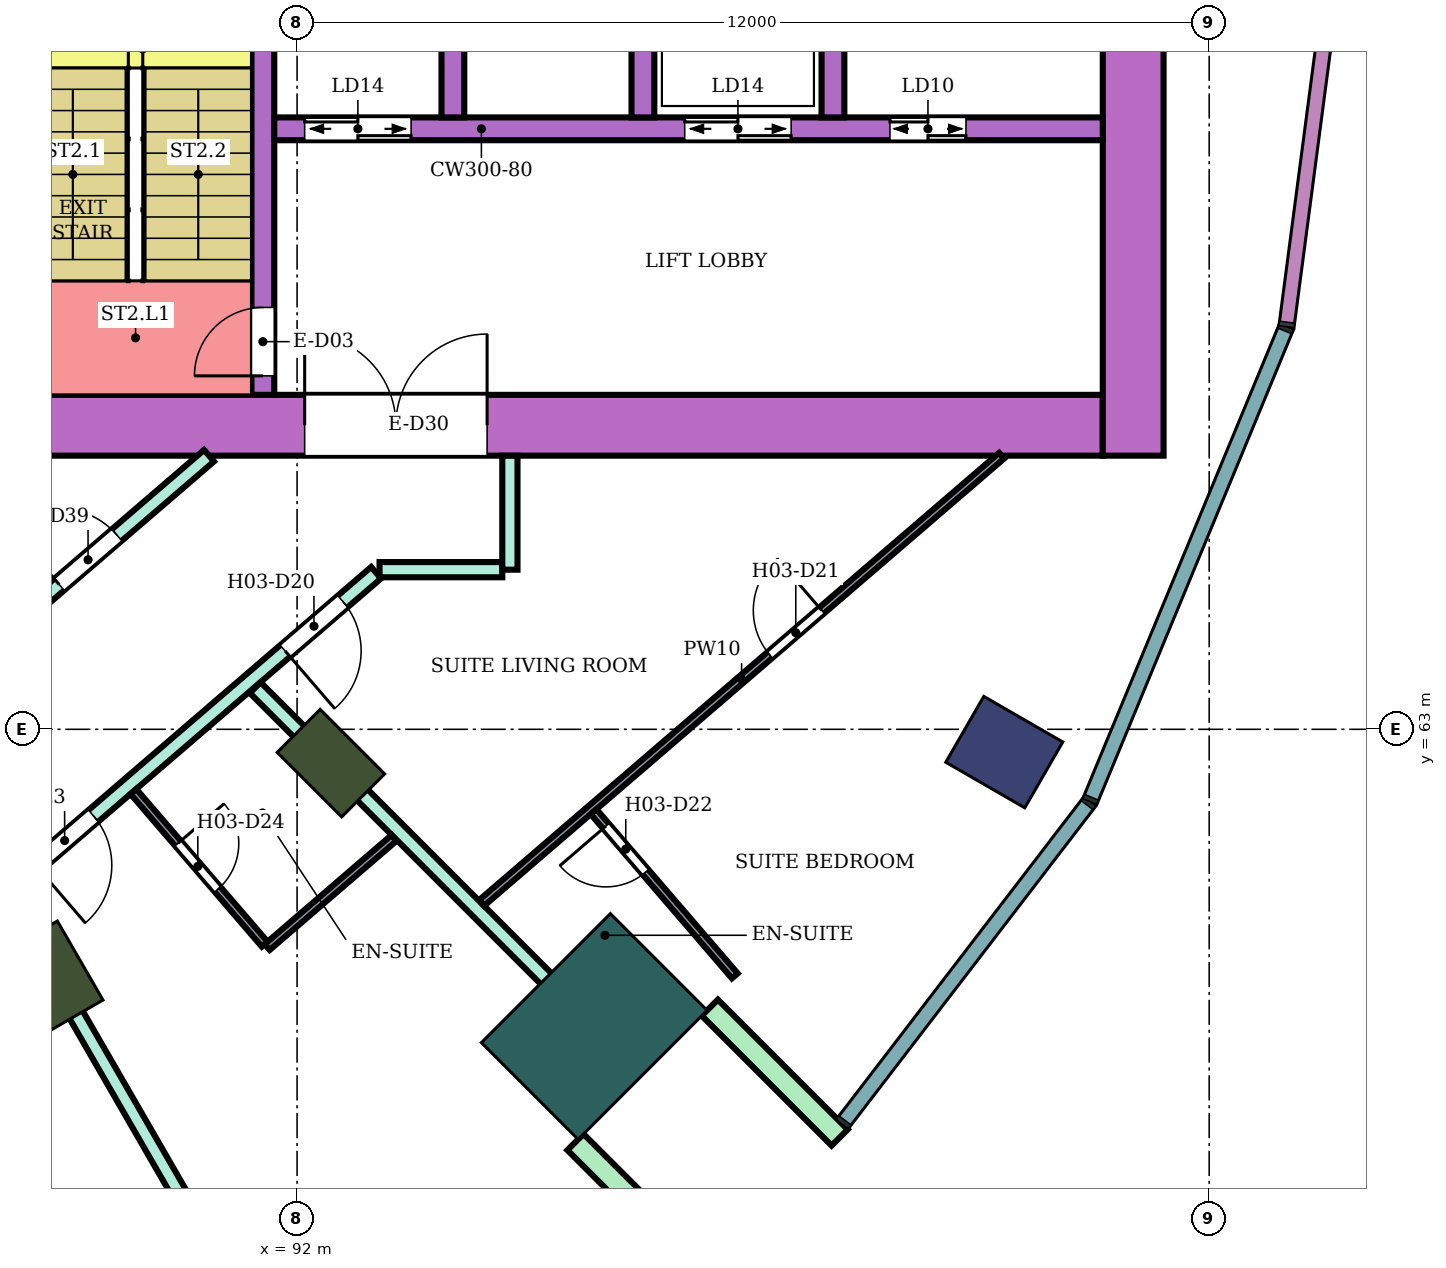
"""IFC4 building model, lengths in metres.
Left out: names, types, materials, properties, quantities, classifications, styles, units other than length and angle.
Written with IfcOpenShell. Run it as: python <this file> out.ifc"""

import sys

from ifc_helpers import new_model, si_unit, direction, frame, frame_2d, origin, origin_2d, place, context, subcontext, project, spatial, rectangle, extrude, element, fill, save


model = new_model("IFC4")
c1 = context("Model", 3, precision=1e-05, world=origin(), true_north=direction((0.0, 1.0)))
c2 = subcontext(c1, "Body", "Model", "MODEL_VIEW")
j1 = project(units=[si_unit("LENGTHUNIT", "METRE"), si_unit("PLANEANGLEUNIT", "RADIAN")], contexts=[c1])
p1 = place(None, origin())
s1 = spatial("IfcSite", under=j1, at=p1, CompositionType="ELEMENT")
p2 = place(p1, origin())
s2 = spatial("IfcBuilding", under=s1, at=p2, CompositionType="ELEMENT")
p3 = place(p2, frame((0.0, 0.0, 51.6)))
s3 = spatial("IfcBuildingStorey", under=s2, at=p3, CompositionType="ELEMENT", Elevation=51.6)
p4 = place(p3, frame((101.304, 62.7, 0.0), z_axis=(0.0, 0.0, 1.0), x_axis=(0.866025403784, -0.5, 0.0)))
e1 = element("IfcColumn", 1, at=p4, inside=s3, PredefinedType="COLUMN", context=c2, shape_type="SweptSolid", body=[
    extrude(rectangle(XDim=1.2, YDim=1.0, at=origin_2d()), origin(), (0.0, 0.0, 1.0), 3.8),
])
for number, where, z_axis, x_axis in (
    (2, (88.8, 59.758, 0.0), (0.0, 0.0, 1.0), (0.5, -0.866, 0.0)),
    (3, (92.445, 62.555, 0.0), (0.0, 0.0, 1.0), (0.707, -0.707, 0.0)),
):
    element("IfcColumn", number, at=place(p3, frame(where, z_axis=z_axis, x_axis=x_axis)), inside=s3, PredefinedType="COLUMN", context=c2, shape_type="SweptSolid", body=[
        extrude(rectangle(XDim=1.2, YDim=0.8, at=origin_2d()), origin(), (0.0, 0.0, 1.0), 3.8),
    ])
p5 = place(p3, frame((95.91, 59.09, 0.0), z_axis=(0.0, 0.0, 1.0), x_axis=(0.707106781187, -0.707106781187, 0.0)))
e4 = element("IfcColumn", 4, at=p5, inside=s3, PredefinedType="COLUMN", context=c2, shape_type="SweptSolid", body=[
    extrude(rectangle(XDim=1.8, YDim=2.4, at=origin_2d()), origin(), (0.0, 0.0, 1.0), 3.8),
])
p6 = place(p3, frame((87.9, 67.0, 0.0), z_axis=(0.0, 0.0, 1.0), x_axis=(1.0, 0.0, 0.0)))
e5 = element("IfcWall", 5, at=p6, inside=s3, PredefinedType="SHEAR", context=c2, shape_type="SweptSolid", body=[
    extrude(rectangle(XDim=14.7, YDim=0.8, at=frame_2d((7.35, 0.0))), origin(), (0.0, 0.0, 1.0), 3.48),
])
p7 = place(p6, frame((4.2, 0.0, 0.0)))
e6 = element("IfcOpeningElement", 6, at=p7, cuts=e5, PredefinedType="OPENING", context=c2, shape_type="SweptSolid", body=[
    extrude(rectangle(XDim=2.4, YDim=2.4, at=frame_2d((1.2, 1.2))), frame((0.0, 0.41, 0.0), z_axis=(0.0, -1.0, 0.0), x_axis=(1.0, 0.0, 0.0)), (0.0, 0.0, 1.0), 0.82),
])
p8 = place(p3, frame((103.0, 66.6, 0.0), z_axis=(0.0, 0.0, 1.0), x_axis=(0.0, 1.0, 0.0)))
e7 = element("IfcWall", 7, at=p8, inside=s3, PredefinedType="SHEAR", context=c2, shape_type="SweptSolid", body=[
    extrude(rectangle(XDim=16.8, YDim=0.8, at=frame_2d((8.4, 0.0))), origin(), (0.0, 0.0, 1.0), 3.48),
])
p9 = place(p3, frame((91.55, 67.4, 0.0), z_axis=(0.0, 0.0, 1.0), x_axis=(0.0, 1.0, 0.0)))
e8 = element("IfcWall", 8, at=p9, inside=s3, PredefinedType="SHEAR", context=c2, shape_type="SweptSolid", body=[
    extrude(rectangle(XDim=7.6, YDim=0.3, at=frame_2d((3.8, 0.0))), origin(), (0.0, 0.0, 1.0), 3.48),
])
p10 = place(p9, frame((0.25, 0.0, 0.0)))
e9 = element("IfcOpeningElement", 9, at=p10, cuts=e8, PredefinedType="OPENING", context=c2, shape_type="SweptSolid", body=[
    extrude(rectangle(XDim=0.9, YDim=2.1, at=frame_2d((0.45, 1.05))), frame((0.0, 0.16, 0.0), z_axis=(0.0, -1.0, 0.0), x_axis=(1.0, 0.0, 0.0)), (0.0, 0.0, 1.0), 0.32),
])
p11 = place(p3, frame((91.7, 70.9, 0.0), z_axis=(0.0, 0.0, 1.0), x_axis=(1.0, 0.0, 0.0)))
e10 = element("IfcWall", 10, at=p11, inside=s3, PredefinedType="SHEAR", context=c2, shape_type="SweptSolid", body=[
    extrude(rectangle(XDim=10.9, YDim=0.3, at=frame_2d((5.45, 0.0))), origin(), (0.0, 0.0, 1.0), 3.48),
])
p12 = place(p11, frame((0.4, 0.0, 0.0)))
e11 = element("IfcOpeningElement", 11, at=p12, cuts=e10, PredefinedType="OPENING", context=c2, shape_type="SweptSolid", body=[
    extrude(rectangle(XDim=1.4, YDim=2.1, at=frame_2d((0.7, 1.05))), frame((0.0, 0.16, 0.0), z_axis=(0.0, -1.0, 0.0), x_axis=(1.0, 0.0, 0.0)), (0.0, 0.0, 1.0), 0.32),
])
p13 = place(p11, frame((5.4, 0.0, 0.0)))
e12 = element("IfcOpeningElement", 12, at=p13, cuts=e10, PredefinedType="OPENING", context=c2, shape_type="SweptSolid", body=[
    extrude(rectangle(XDim=1.4, YDim=2.1, at=frame_2d((0.7, 1.05))), frame((0.0, 0.16, 0.0), z_axis=(0.0, -1.0, 0.0), x_axis=(1.0, 0.0, 0.0)), (0.0, 0.0, 1.0), 0.32),
])
p14 = place(p11, frame((8.1, 0.0, 0.0)))
e13 = element("IfcOpeningElement", 13, at=p14, cuts=e10, PredefinedType="OPENING", context=c2, shape_type="SweptSolid", body=[
    extrude(rectangle(XDim=1.0, YDim=2.1, at=frame_2d((0.5, 1.05))), frame((0.0, 0.16, 0.0), z_axis=(0.0, -1.0, 0.0), x_axis=(1.0, 0.0, 0.0)), (0.0, 0.0, 1.0), 0.32),
])
for number, where, z_axis, x_axis in (
    (14, (94.05, 71.05, 0.0), (0.0, 0.0, 1.0), (0.0, 1.0, 0.0)),
    (15, (96.55, 71.05, 0.0), (0.0, 0.0, 1.0), (0.0, 1.0, 0.0)),
    (16, (99.05, 71.05, 0.0), (0.0, 0.0, 1.0), (0.0, 1.0, 0.0)),
):
    element("IfcWall", number, at=place(p3, frame(where, z_axis=z_axis, x_axis=x_axis)), inside=s3, PredefinedType="SHEAR", context=c2, shape_type="SweptSolid", body=[
        extrude(rectangle(XDim=2.55, YDim=0.3, at=frame_2d((1.275, 0.0))), origin(), (0.0, 0.0, 1.0), 3.48),
    ])
for number, where, z_axis, x_axis in (
    (17, (95.662, 57.57, 0.0), (0.0, 0.0, 1.0), (0.707, -0.707, 0.0)),
    (18, (97.43, 59.338, 0.0), (0.0, 0.0, 1.0), (0.707, -0.707, 0.0)),
):
    element("IfcWall", number, at=place(p3, frame(where, z_axis=z_axis, x_axis=x_axis)), inside=s3, PredefinedType="NOTDEFINED", context=c2, shape_type="SweptSolid", body=[
        extrude(rectangle(XDim=2.416, YDim=0.3, at=frame_2d((1.208, 0.0))), origin(), (0.0, 0.0, 1.0), 3.8),
    ])
p15 = place(p3, frame((86.877, 63.189, 0.0), z_axis=(0.0, 0.0, 1.0), x_axis=(0.758164888471, 0.652062881853, 0.0)))
e19 = element("IfcWall", 19, at=p15, inside=s3, PredefinedType="PARTITIONING", context=c2, shape_type="SweptSolid", body=[
    extrude(rectangle(XDim=5.23, YDim=0.2, at=frame_2d((2.615, 0.0))), origin(), (0.0, 0.0, 1.0), 3.35),
])
p16 = place(p15, frame((2.63, 0.0, 0.0)))
e20 = element("IfcOpeningElement", 20, at=p16, cuts=e19, PredefinedType="OPENING", context=c2, shape_type="SweptSolid", body=[
    extrude(rectangle(XDim=1.0, YDim=2.1, at=frame_2d((0.5, 1.05))), frame((0.0, 0.11, 0.0), z_axis=(0.0, -1.0, 0.0), x_axis=(1.0, 0.0, 0.0)), (0.0, 0.0, 1.0), 0.22),
])
p17 = place(p3, frame((88.236, 60.929, 0.0), z_axis=(0.0, 0.0, 1.0), x_axis=(0.758227485202, 0.651990092474, 0.0)))
e21 = element("IfcWall", 21, at=p17, inside=s3, PredefinedType="PARTITIONING", context=c2, shape_type="SweptSolid", body=[
    extrude(rectangle(XDim=6.336, YDim=0.2, at=frame_2d((3.168, 0.0))), origin(), (0.0, 0.0, 1.0), 3.35),
])
p18 = place(p17, frame((4.757, 0.0, 0.0)))
e22 = element("IfcOpeningElement", 22, at=p18, cuts=e21, PredefinedType="OPENING", context=c2, shape_type="SweptSolid", body=[
    extrude(rectangle(XDim=1.0, YDim=2.1, at=frame_2d((0.5, 1.05))), frame((0.0, 0.11, 0.0), z_axis=(0.0, -1.0, 0.0), x_axis=(1.0, 0.0, 0.0)), (0.0, 0.0, 1.0), 0.22),
])
p19 = place(p17, frame((0.43, 0.0, 0.0)))
e23 = element("IfcOpeningElement", 23, at=p19, cuts=e21, PredefinedType="OPENING", context=c2, shape_type="SweptSolid", body=[
    extrude(rectangle(XDim=1.0, YDim=2.1, at=frame_2d((0.5, 1.05))), frame((0.0, 0.11, 0.0), z_axis=(0.0, -1.0, 0.0), x_axis=(1.0, 0.0, 0.0)), (0.0, 0.0, 1.0), 0.22),
])
p20 = place(p3, frame((88.159, 60.863, 0.0), z_axis=(0.0, 0.0, 1.0), x_axis=(0.499886028459, -0.866091195286, 0.0)))
e24 = element("IfcWall", 24, at=p20, inside=s3, PredefinedType="PARTITIONING", context=c2, shape_type="SweptSolid", body=[
    extrude(rectangle(XDim=9.475, YDim=0.2, at=frame_2d((4.737, 0.0))), origin(), (0.0, 0.0, 1.0), 3.35),
])
p21 = place(p3, frame((91.449, 63.548, 0.0), z_axis=(0.0, 0.0, 1.0), x_axis=(0.706984810649, -0.707228730688, 0.0)))
e25 = element("IfcWall", 25, at=p21, inside=s3, PredefinedType="PARTITIONING", context=c2, shape_type="SweptSolid", body=[
    extrude(rectangle(XDim=7.006, YDim=0.2, at=frame_2d((3.503, 0.0))), origin(), (0.0, 0.0, 1.0), 3.35),
])
p22 = place(p3, frame((93.085, 65.1, 0.0), z_axis=(0.0, 0.0, 1.0), x_axis=(1.0, 0.0, 0.0)))
e26 = element("IfcWall", 26, at=p22, inside=s3, PredefinedType="PARTITIONING", context=c2, shape_type="SweptSolid", body=[
    extrude(rectangle(XDim=1.615, YDim=0.2, at=frame_2d((0.808, 0.0))), origin(), (0.0, 0.0, 1.0), 3.35),
])
p23 = place(p3, frame((94.8, 65.1, 0.0), z_axis=(0.0, 0.0, 1.0), x_axis=(0.0, 1.0, 0.0)))
e27 = element("IfcWall", 27, at=p23, inside=s3, PredefinedType="PARTITIONING", context=c2, shape_type="SweptSolid", body=[
    extrude(rectangle(XDim=1.499, YDim=0.2, at=frame_2d((0.75, 0.0))), origin(), (0.0, 0.0, 1.0), 3.35),
])
p24 = place(p3, frame((89.846, 62.182, 0.0), z_axis=(0.0, 0.0, 1.0), x_axis=(0.652095405055, -0.758136915541, 0.0)))
e28 = element("IfcWall", 28, at=p24, inside=s3, PredefinedType="PARTITIONING", context=c2, shape_type="SweptSolid", body=[
    extrude(rectangle(XDim=2.65, YDim=0.1, at=frame_2d((1.325, 0.0))), origin(), (0.0, 0.0, 1.0), 3.35),
])
p25 = place(p24, frame((0.9, 0.0, 0.0)))
e29 = element("IfcOpeningElement", 29, at=p25, cuts=e28, PredefinedType="OPENING", context=c2, shape_type="SweptSolid", body=[
    extrude(rectangle(XDim=0.8, YDim=2.1, at=frame_2d((0.4, 1.05))), frame((0.0, 0.06, 0.0), z_axis=(0.0, -1.0, 0.0), x_axis=(1.0, 0.0, 0.0)), (0.0, 0.0, 1.0), 0.12),
])
p26 = place(p3, frame((91.607, 60.135, 0.0), z_axis=(0.0, 0.0, 1.0), x_axis=(0.758135842672, 0.652096652388, 0.0)))
e30 = element("IfcWall", 30, at=p26, inside=s3, PredefinedType="PARTITIONING", context=c2, shape_type="SweptSolid", body=[
    extrude(rectangle(XDim=2.201, YDim=0.1, at=frame_2d((1.101, 0.0))), origin(), (0.0, 0.0, 1.0), 3.35),
])
p27 = place(p3, frame((94.428, 60.715, 0.0), z_axis=(0.0, 0.0, 1.0), x_axis=(0.758117248367, 0.65211826974, 0.0)))
e31 = element("IfcWall", 31, at=p27, inside=s3, PredefinedType="PARTITIONING", context=c2, shape_type="SweptSolid", body=[
    extrude(rectangle(XDim=9.024, YDim=0.1, at=frame_2d((4.512, 0.0))), origin(), (0.0, 0.0, 1.0), 3.35),
])
p28 = place(p27, frame((5.002, 0.0, 0.0)))
e32 = element("IfcOpeningElement", 32, at=p28, cuts=e31, PredefinedType="OPENING", context=c2, shape_type="SweptSolid", body=[
    extrude(rectangle(XDim=0.9, YDim=2.1, at=frame_2d((0.45, 1.05))), frame((0.0, 0.06, 0.0), z_axis=(0.0, -1.0, 0.0), x_axis=(1.0, 0.0, 0.0)), (0.0, 0.0, 1.0), 0.12),
])
p29 = place(p3, frame((95.901, 61.916, 0.0), z_axis=(0.0, 0.0, 1.0), x_axis=(0.652215581117, -0.758033532074, 0.0)))
e33 = element("IfcWall", 33, at=p29, inside=s3, PredefinedType="PARTITIONING", context=c2, shape_type="SweptSolid", body=[
    extrude(rectangle(XDim=2.849, YDim=0.1, at=frame_2d((1.425, 0.0))), origin(), (0.0, 0.0, 1.0), 3.35),
])
p30 = place(p29, frame((0.25, 0.0, 0.0)))
e34 = element("IfcOpeningElement", 34, at=p30, cuts=e33, PredefinedType="OPENING", context=c2, shape_type="SweptSolid", body=[
    extrude(rectangle(XDim=0.8, YDim=2.1, at=frame_2d((0.4, 1.05))), frame((0.0, 0.06, 0.0), z_axis=(0.0, -1.0, 0.0), x_axis=(1.0, 0.0, 0.0)), (0.0, 0.0, 1.0), 0.12),
])
p31 = place(p18, frame((1.0, 0.0, 0.0), z_axis=(0.0, 0.0, 1.0), x_axis=(-1.0, 0.0, 0.0)))
e35 = element("IfcDoor", 35, at=p31, inside=s3, OperationType="SINGLE_SWING_RIGHT", PredefinedType="DOOR", context=c2, shape_type="SweptSolid", body=[
    extrude(rectangle(XDim=1.0, YDim=2.1, at=frame_2d((0.5, 1.05))), frame((0.0, 0.025, 0.0), z_axis=(0.0, -1.0, 0.0), x_axis=(1.0, 0.0, 0.0)), (0.0, 0.0, 1.0), 0.05),
])
fill(e22, e35)
p32 = place(p28, origin())
e36 = element("IfcDoor", 36, at=p32, inside=s3, OperationType="SINGLE_SWING_RIGHT", PredefinedType="DOOR", context=c2, shape_type="SweptSolid", body=[
    extrude(rectangle(XDim=0.9, YDim=2.1, at=frame_2d((0.45, 1.05))), frame((0.0, 0.025, 0.0), z_axis=(0.0, -1.0, 0.0), x_axis=(1.0, 0.0, 0.0)), (0.0, 0.0, 1.0), 0.05),
])
fill(e32, e36)
p33 = place(p30, frame((0.8, 0.0, 0.0), z_axis=(0.0, 0.0, 1.0), x_axis=(-1.0, 0.0, 0.0)))
e37 = element("IfcDoor", 37, at=p33, inside=s3, OperationType="SINGLE_SWING_RIGHT", PredefinedType="DOOR", context=c2, shape_type="SweptSolid", body=[
    extrude(rectangle(XDim=0.8, YDim=2.1, at=frame_2d((0.4, 1.05))), frame((0.0, 0.025, 0.0), z_axis=(0.0, -1.0, 0.0), x_axis=(1.0, 0.0, 0.0)), (0.0, 0.0, 1.0), 0.05),
])
fill(e34, e37)
p34 = place(p19, frame((1.0, 0.0, 0.0), z_axis=(0.0, 0.0, 1.0), x_axis=(-1.0, 0.0, 0.0)))
e38 = element("IfcDoor", 38, at=p34, inside=s3, OperationType="SINGLE_SWING_RIGHT", PredefinedType="DOOR", context=c2, shape_type="SweptSolid", body=[
    extrude(rectangle(XDim=1.0, YDim=2.1, at=frame_2d((0.5, 1.05))), frame((0.0, 0.025, 0.0), z_axis=(0.0, -1.0, 0.0), x_axis=(1.0, 0.0, 0.0)), (0.0, 0.0, 1.0), 0.05),
])
fill(e23, e38)
p35 = place(p25, origin())
e39 = element("IfcDoor", 39, at=p35, inside=s3, OperationType="SINGLE_SWING_LEFT", PredefinedType="DOOR", context=c2, shape_type="SweptSolid", body=[
    extrude(rectangle(XDim=0.8, YDim=2.1, at=frame_2d((0.4, 1.05))), frame((0.0, 0.025, 0.0), z_axis=(0.0, -1.0, 0.0), x_axis=(1.0, 0.0, 0.0)), (0.0, 0.0, 1.0), 0.05),
])
fill(e29, e39)
p36 = place(p16, origin())
e40 = element("IfcDoor", 40, at=p36, inside=s3, OperationType="SINGLE_SWING_LEFT", PredefinedType="DOOR", context=c2, shape_type="SweptSolid", body=[
    extrude(rectangle(XDim=1.0, YDim=2.1, at=frame_2d((0.5, 1.05))), frame((0.0, 0.025, 0.0), z_axis=(0.0, -1.0, 0.0), x_axis=(1.0, 0.0, 0.0)), (0.0, 0.0, 1.0), 0.05),
])
fill(e20, e40)
p37 = place(p10, origin())
e41 = element("IfcDoor", 41, at=p37, inside=s3, OperationType="SINGLE_SWING_LEFT", PredefinedType="DOOR", context=c2, shape_type="SweptSolid", body=[
    extrude(rectangle(XDim=0.9, YDim=2.1, at=frame_2d((0.45, 1.05))), frame((0.0, 0.025, 0.0), z_axis=(0.0, -1.0, 0.0), x_axis=(1.0, 0.0, 0.0)), (0.0, 0.0, 1.0), 0.05),
])
fill(e9, e41)
p38 = place(p12, origin())
e42 = element("IfcDoor", 42, at=p38, inside=s3, OperationType="DOUBLE_DOOR_SLIDING", PredefinedType="DOOR", context=c2, shape_type="SweptSolid", body=[
    extrude(rectangle(XDim=1.4, YDim=2.1, at=frame_2d((0.7, 1.05))), frame((0.0, 0.025, 0.0), z_axis=(0.0, -1.0, 0.0), x_axis=(1.0, 0.0, 0.0)), (0.0, 0.0, 1.0), 0.05),
])
fill(e11, e42)
p39 = place(p13, origin())
e43 = element("IfcDoor", 43, at=p39, inside=s3, OperationType="DOUBLE_DOOR_SLIDING", PredefinedType="DOOR", context=c2, shape_type="SweptSolid", body=[
    extrude(rectangle(XDim=1.4, YDim=2.1, at=frame_2d((0.7, 1.05))), frame((0.0, 0.025, 0.0), z_axis=(0.0, -1.0, 0.0), x_axis=(1.0, 0.0, 0.0)), (0.0, 0.0, 1.0), 0.05),
])
fill(e12, e43)
p40 = place(p14, origin())
e44 = element("IfcDoor", 44, at=p40, inside=s3, OperationType="DOUBLE_DOOR_SLIDING", PredefinedType="DOOR", context=c2, shape_type="SweptSolid", body=[
    extrude(rectangle(XDim=1.0, YDim=2.1, at=frame_2d((0.5, 1.05))), frame((0.0, 0.025, 0.0), z_axis=(0.0, -1.0, 0.0), x_axis=(1.0, 0.0, 0.0)), (0.0, 0.0, 1.0), 0.05),
])
fill(e13, e44)
p41 = place(p7, origin())
e45 = element("IfcDoor", 45, at=p41, inside=s3, OperationType="DOUBLE_DOOR_SINGLE_SWING", PredefinedType="DOOR", context=c2, shape_type="SweptSolid", body=[
    extrude(rectangle(XDim=2.4, YDim=2.4, at=frame_2d((1.2, 1.2))), frame((0.0, 0.025, 0.0), z_axis=(0.0, -1.0, 0.0), x_axis=(1.0, 0.0, 0.0)), (0.0, 0.0, 1.0), 0.05),
])
fill(e6, e45)
save(model, sys.argv[1])
